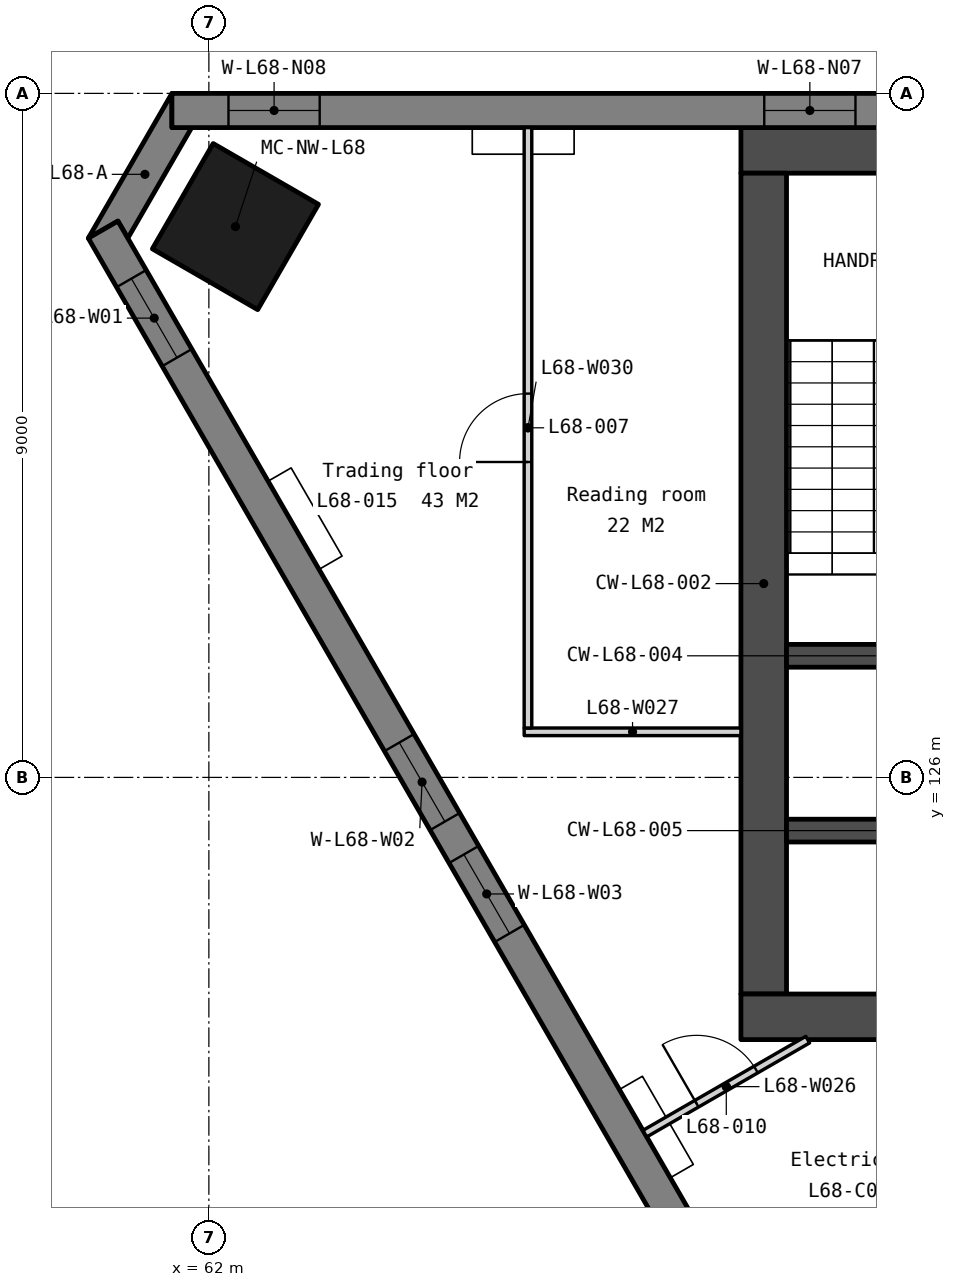
"""IFC4 building model, lengths in metres.
Left out: names, types, materials, properties, quantities, classifications, styles, units other than length and angle.
Written with IfcOpenShell. Run it as: python <this file> out.ifc"""

import sys

from ifc_helpers import new_model, si_unit, direction, frame, frame_2d, origin, origin_2d, place, context, subcontext, project, spatial, polyline, rectangle, outline, extrude, element, fill, save


model = new_model("IFC4")
c1 = context("Model", 3, precision=1e-05, world=origin(), true_north=direction((0.0, 1.0)))
c2 = subcontext(c1, "Body", "Model", "MODEL_VIEW")
j1 = project(units=[si_unit("LENGTHUNIT", "METRE"), si_unit("PLANEANGLEUNIT", "RADIAN")], contexts=[c1])
p1 = place(None, origin())
s1 = spatial("IfcSite", under=j1, at=p1, CompositionType="ELEMENT")
p2 = place(p1, origin())
s2 = spatial("IfcBuilding", under=s1, at=p2, CompositionType="ELEMENT")
p3 = place(p2, frame((0.0, 0.0, 277.7)))
s3 = spatial("IfcBuildingStorey", under=s2, at=p3, CompositionType="ELEMENT", Elevation=277.7)
p4 = place(p3, frame((62.349, 133.247, 0.0), z_axis=(0.0, 0.0, 1.0), x_axis=(-0.5, -0.866025403784, 0.0)))
e1 = element("IfcColumn", 1, at=p4, inside=s3, PredefinedType="COLUMN", context=c2, shape_type="SweptSolid", body=[
    extrude(rectangle(XDim=1.6, YDim=1.6, at=origin_2d()), origin(), (0.0, 0.0, 1.0), 3.9),
])
p5 = place(p3, frame((69.0, 134.25, 0.0), z_axis=(0.0, 0.0, 1.0), x_axis=(1.0, 0.0, 0.0)))
e2 = element("IfcWall", 2, at=p5, inside=s3, PredefinedType="SOLIDWALL", context=c2, shape_type="SweptSolid", body=[
    extrude(rectangle(XDim=22.0, YDim=0.6, at=frame_2d((11.0, 0.0))), origin(), (0.0, 0.0, 1.0), 3.75),
])
p6 = place(p3, frame((69.3, 133.95, 0.0), z_axis=(0.0, 0.0, 1.0), x_axis=(0.0, -1.0, 0.0)))
e3 = element("IfcWall", 3, at=p6, inside=s3, PredefinedType="SOLIDWALL", context=c2, shape_type="SweptSolid", body=[
    extrude(rectangle(XDim=10.8, YDim=0.6, at=frame_2d((5.4, 0.0))), origin(), (0.0, 0.0, 1.0), 3.75),
])
p7 = place(p3, frame((69.0, 122.85, 0.0), z_axis=(0.0, 0.0, 1.0), x_axis=(1.0, 0.0, 0.0)))
e4 = element("IfcWall", 4, at=p7, inside=s3, PredefinedType="SOLIDWALL", context=c2, shape_type="SweptSolid", body=[
    extrude(rectangle(XDim=22.0, YDim=0.6, at=frame_2d((11.0, 0.0))), origin(), (0.0, 0.0, 1.0), 3.75),
])
p8 = place(p7, frame((16.375, 0.0, 0.0)))
e5 = element("IfcOpeningElement", 5, at=p8, cuts=e4, PredefinedType="OPENING", context=c2, shape_type="SweptSolid", body=[
    extrude(rectangle(XDim=1.8, YDim=2.1, at=frame_2d((0.9, 1.05))), frame((0.0, 0.31, 0.0), z_axis=(0.0, -1.0, 0.0), x_axis=(1.0, 0.0, 0.0)), (0.0, 0.0, 1.0), 0.62),
])
p9 = place(p7, frame((3.825, 0.0, 0.0)))
e6 = element("IfcOpeningElement", 6, at=p9, cuts=e4, PredefinedType="OPENING", context=c2, shape_type="SweptSolid", body=[
    extrude(rectangle(XDim=1.8, YDim=2.1, at=frame_2d((0.9, 1.05))), frame((0.0, 0.31, 0.0), z_axis=(0.0, -1.0, 0.0), x_axis=(1.0, 0.0, 0.0)), (0.0, 0.0, 1.0), 0.62),
])
p10 = place(p7, frame((12.85, 0.0, 0.0)))
e7 = element("IfcOpeningElement", 7, at=p10, cuts=e4, PredefinedType="OPENING", context=c2, shape_type="SweptSolid", body=[
    extrude(rectangle(XDim=1.5, YDim=2.1, at=frame_2d((0.75, 1.05))), frame((0.0, 0.31, 0.0), z_axis=(0.0, -1.0, 0.0), x_axis=(1.0, 0.0, 0.0)), (0.0, 0.0, 1.0), 0.62),
])
for number, where, z_axis, x_axis in (
    (8, (69.6, 127.6, 0.0), (0.0, 0.0, 1.0), (1.0, 0.0, 0.0)),
    (9, (69.6, 125.3, 0.0), (0.0, 0.0, 1.0), (1.0, 0.0, 0.0)),
):
    element("IfcWall", number, at=place(p3, frame(where, z_axis=z_axis, x_axis=x_axis)), inside=s3, PredefinedType="SOLIDWALL", context=c2, shape_type="SweptSolid", body=[
        extrude(rectangle(XDim=2.55, YDim=0.3, at=frame_2d((1.275, 0.0))), origin(), (0.0, 0.0, 1.0), 3.75),
    ])
p11 = place(p3, frame((0.0, 0.0, -0.15)))
e10 = element("IfcWall", 10, at=p11, inside=s3, PredefinedType="SOLIDWALL", context=c2, shape_type="SweptSolid", body=[
    extrude(outline(polyline([(61.514, 135.0), (61.514, 134.55), (61.774, 134.55), (60.933, 133.095), (60.803, 133.32), (60.414, 133.095), (61.514, 135.0)])), origin(), (0.0, 0.0, 1.0), 3.9),
])
p12 = place(p3, frame((98.486, 134.775, -0.15), z_axis=(0.0, 0.0, 1.0), x_axis=(-1.0, 0.0, 0.0)))
e11 = element("IfcWall", 11, at=p12, inside=s3, PredefinedType="SOLIDWALL", context=c2, shape_type="SweptSolid", body=[
    extrude(outline(polyline([(36.972, 0.0), (36.972, 3.9), (0.0, 3.9), (0.0, 0.0), (36.972, 0.0)])), frame((0.0, 0.225, 0.0), z_axis=(0.0, -1.0, 0.0), x_axis=(1.0, 0.0, 0.0)), (0.0, 0.0, 1.0), 0.45),
])
p13 = place(p12, frame((0.744, 0.0, 0.95)))
e12 = element("IfcOpeningElement", 12, at=p13, cuts=e11, PredefinedType="OPENING", context=c2, shape_type="SweptSolid", body=[
    extrude(rectangle(XDim=1.2, YDim=2.2, at=frame_2d((0.6, 1.1))), frame((0.0, 0.235, 0.0), z_axis=(0.0, -1.0, 0.0), x_axis=(1.0, 0.0, 0.0)), (0.0, 0.0, 1.0), 0.47),
])
p14 = place(p12, frame((7.793, 0.0, 0.95)))
e13 = element("IfcOpeningElement", 13, at=p14, cuts=e11, PredefinedType="OPENING", context=c2, shape_type="SweptSolid", body=[
    extrude(rectangle(XDim=1.2, YDim=2.2, at=frame_2d((0.6, 1.1))), frame((0.0, 0.235, 0.0), z_axis=(0.0, -1.0, 0.0), x_axis=(1.0, 0.0, 0.0)), (0.0, 0.0, 1.0), 0.47),
])
p15 = place(p12, frame((9.493, 0.0, 0.95)))
e14 = element("IfcOpeningElement", 14, at=p15, cuts=e11, PredefinedType="OPENING", context=c2, shape_type="SweptSolid", body=[
    extrude(rectangle(XDim=1.2, YDim=2.2, at=frame_2d((0.6, 1.1))), frame((0.0, 0.235, 0.0), z_axis=(0.0, -1.0, 0.0), x_axis=(1.0, 0.0, 0.0)), (0.0, 0.0, 1.0), 0.47),
])
p16 = place(p12, frame((17.036, 0.0, 0.95)))
e15 = element("IfcOpeningElement", 15, at=p16, cuts=e11, PredefinedType="OPENING", context=c2, shape_type="SweptSolid", body=[
    extrude(rectangle(XDim=1.2, YDim=2.2, at=frame_2d((0.6, 1.1))), frame((0.0, 0.235, 0.0), z_axis=(0.0, -1.0, 0.0), x_axis=(1.0, 0.0, 0.0)), (0.0, 0.0, 1.0), 0.47),
])
p17 = place(p12, frame((18.736, 0.0, 0.95)))
e16 = element("IfcOpeningElement", 16, at=p17, cuts=e11, PredefinedType="OPENING", context=c2, shape_type="SweptSolid", body=[
    extrude(rectangle(XDim=1.2, YDim=2.2, at=frame_2d((0.6, 1.1))), frame((0.0, 0.235, 0.0), z_axis=(0.0, -1.0, 0.0), x_axis=(1.0, 0.0, 0.0)), (0.0, 0.0, 1.0), 0.47),
])
p18 = place(p12, frame((26.279, 0.0, 0.95)))
e17 = element("IfcOpeningElement", 17, at=p18, cuts=e11, PredefinedType="OPENING", context=c2, shape_type="SweptSolid", body=[
    extrude(rectangle(XDim=1.2, YDim=2.2, at=frame_2d((0.6, 1.1))), frame((0.0, 0.235, 0.0), z_axis=(0.0, -1.0, 0.0), x_axis=(1.0, 0.0, 0.0)), (0.0, 0.0, 1.0), 0.47),
])
p19 = place(p12, frame((27.979, 0.0, 0.95)))
e18 = element("IfcOpeningElement", 18, at=p19, cuts=e11, PredefinedType="OPENING", context=c2, shape_type="SweptSolid", body=[
    extrude(rectangle(XDim=1.2, YDim=2.2, at=frame_2d((0.6, 1.1))), frame((0.0, 0.235, 0.0), z_axis=(0.0, -1.0, 0.0), x_axis=(1.0, 0.0, 0.0)), (0.0, 0.0, 1.0), 0.47),
])
p20 = place(p12, frame((35.028, 0.0, 0.95)))
e19 = element("IfcOpeningElement", 19, at=p20, cuts=e11, PredefinedType="OPENING", context=c2, shape_type="SweptSolid", body=[
    extrude(rectangle(XDim=1.2, YDim=2.2, at=frame_2d((0.6, 1.1))), frame((0.0, 0.235, 0.0), z_axis=(0.0, -1.0, 0.0), x_axis=(1.0, 0.0, 0.0)), (0.0, 0.0, 1.0), 0.47),
])
p21 = place(p3, frame((60.609, 133.207, -0.15), z_axis=(0.0, 0.0, 1.0), x_axis=(0.500002536638, -0.866023939251, 0.0)))
e20 = element("IfcWall", 20, at=p21, inside=s3, PredefinedType="SOLIDWALL", context=c2, shape_type="SweptSolid", body=[
    extrude(outline(polyline([(36.972, 0.0), (36.972, 3.9), (0.0, 3.9), (0.0, 0.0), (36.972, 0.0)])), frame((0.0, 0.225, 0.0), z_axis=(0.0, -1.0, 0.0), x_axis=(1.0, 0.0, 0.0)), (0.0, 0.0, 1.0), 0.45),
])
p22 = place(p21, frame((0.744, 0.0, 0.95)))
e21 = element("IfcOpeningElement", 21, at=p22, cuts=e20, PredefinedType="OPENING", context=c2, shape_type="SweptSolid", body=[
    extrude(rectangle(XDim=1.2, YDim=2.2, at=frame_2d((0.6, 1.1))), frame((0.0, 0.235, 0.0), z_axis=(0.0, -1.0, 0.0), x_axis=(1.0, 0.0, 0.0)), (0.0, 0.0, 1.0), 0.47),
])
p23 = place(p21, frame((7.793, 0.0, 0.95)))
e22 = element("IfcOpeningElement", 22, at=p23, cuts=e20, PredefinedType="OPENING", context=c2, shape_type="SweptSolid", body=[
    extrude(rectangle(XDim=1.2, YDim=2.2, at=frame_2d((0.6, 1.1))), frame((0.0, 0.235, 0.0), z_axis=(0.0, -1.0, 0.0), x_axis=(1.0, 0.0, 0.0)), (0.0, 0.0, 1.0), 0.47),
])
p24 = place(p21, frame((9.493, 0.0, 0.95)))
e23 = element("IfcOpeningElement", 23, at=p24, cuts=e20, PredefinedType="OPENING", context=c2, shape_type="SweptSolid", body=[
    extrude(rectangle(XDim=1.2, YDim=2.2, at=frame_2d((0.6, 1.1))), frame((0.0, 0.235, 0.0), z_axis=(0.0, -1.0, 0.0), x_axis=(1.0, 0.0, 0.0)), (0.0, 0.0, 1.0), 0.47),
])
p25 = place(p21, frame((17.036, 0.0, 0.95)))
e24 = element("IfcOpeningElement", 24, at=p25, cuts=e20, PredefinedType="OPENING", context=c2, shape_type="SweptSolid", body=[
    extrude(rectangle(XDim=1.2, YDim=2.2, at=frame_2d((0.6, 1.1))), frame((0.0, 0.235, 0.0), z_axis=(0.0, -1.0, 0.0), x_axis=(1.0, 0.0, 0.0)), (0.0, 0.0, 1.0), 0.47),
])
p26 = place(p21, frame((18.736, 0.0, 0.95)))
e25 = element("IfcOpeningElement", 25, at=p26, cuts=e20, PredefinedType="OPENING", context=c2, shape_type="SweptSolid", body=[
    extrude(rectangle(XDim=1.2, YDim=2.2, at=frame_2d((0.6, 1.1))), frame((0.0, 0.235, 0.0), z_axis=(0.0, -1.0, 0.0), x_axis=(1.0, 0.0, 0.0)), (0.0, 0.0, 1.0), 0.47),
])
p27 = place(p21, frame((26.279, 0.0, 0.95)))
e26 = element("IfcOpeningElement", 26, at=p27, cuts=e20, PredefinedType="OPENING", context=c2, shape_type="SweptSolid", body=[
    extrude(rectangle(XDim=1.2, YDim=2.2, at=frame_2d((0.6, 1.1))), frame((0.0, 0.235, 0.0), z_axis=(0.0, -1.0, 0.0), x_axis=(1.0, 0.0, 0.0)), (0.0, 0.0, 1.0), 0.47),
])
p28 = place(p21, frame((27.979, 0.0, 0.95)))
e27 = element("IfcOpeningElement", 27, at=p28, cuts=e20, PredefinedType="OPENING", context=c2, shape_type="SweptSolid", body=[
    extrude(rectangle(XDim=1.2, YDim=2.2, at=frame_2d((0.6, 1.1))), frame((0.0, 0.235, 0.0), z_axis=(0.0, -1.0, 0.0), x_axis=(1.0, 0.0, 0.0)), (0.0, 0.0, 1.0), 0.47),
])
p29 = place(p21, frame((35.028, 0.0, 0.95)))
e28 = element("IfcOpeningElement", 28, at=p29, cuts=e20, PredefinedType="OPENING", context=c2, shape_type="SweptSolid", body=[
    extrude(rectangle(XDim=1.2, YDim=2.2, at=frame_2d((0.6, 1.1))), frame((0.0, 0.235, 0.0), z_axis=(0.0, -1.0, 0.0), x_axis=(1.0, 0.0, 0.0)), (0.0, 0.0, 1.0), 0.47),
])
p30 = place(p3, frame((67.736, 121.313, 0.0), z_axis=(0.0, 0.0, 1.0), x_axis=(0.86604923931, 0.499958713387, 0.0)))
e29 = element("IfcWall", 29, at=p30, inside=s3, PredefinedType="PARTITIONING", context=c2, shape_type="SweptSolid", body=[
    extrude(rectangle(XDim=2.475, YDim=0.1, at=frame_2d((1.237, 0.0))), origin(), (0.0, 0.0, 1.0), 3.75),
])
p31 = place(p30, frame((0.787, 0.0, 0.0)))
e30 = element("IfcOpeningElement", 30, at=p31, cuts=e29, PredefinedType="OPENING", context=c2, shape_type="SweptSolid", body=[
    extrude(rectangle(XDim=0.9, YDim=2.1, at=frame_2d((0.45, 1.05))), frame((0.0, 0.06, 0.0), z_axis=(0.0, -1.0, 0.0), x_axis=(1.0, 0.0, 0.0)), (0.0, 0.0, 1.0), 0.12),
])
p32 = place(p3, frame((66.148, 126.6, 0.0), z_axis=(0.0, 0.0, 1.0), x_axis=(1.0, 0.0, 0.0)))
e31 = element("IfcWall", 31, at=p32, inside=s3, PredefinedType="PARTITIONING", context=c2, shape_type="SweptSolid", body=[
    extrude(rectangle(XDim=2.852, YDim=0.1, at=frame_2d((1.426, 0.0))), origin(), (0.0, 0.0, 1.0), 3.75),
])
p33 = place(p3, frame((66.198, 126.65, 0.0), z_axis=(0.0, 0.0, 1.0), x_axis=(0.0, 1.0, 0.0)))
e32 = element("IfcWall", 32, at=p33, inside=s3, PredefinedType="PARTITIONING", context=c2, shape_type="SweptSolid", body=[
    extrude(rectangle(XDim=7.9, YDim=0.1, at=frame_2d((3.95, 0.0))), origin(), (0.0, 0.0, 1.0), 3.75),
])
p34 = place(p33, frame((3.5, 0.0, 0.0)))
e33 = element("IfcOpeningElement", 33, at=p34, cuts=e32, PredefinedType="OPENING", context=c2, shape_type="SweptSolid", body=[
    extrude(rectangle(XDim=0.9, YDim=2.1, at=frame_2d((0.45, 1.05))), frame((0.0, 0.06, 0.0), z_axis=(0.0, -1.0, 0.0), x_axis=(1.0, 0.0, 0.0)), (0.0, 0.0, 1.0), 0.12),
])
p35 = place(p19, origin())
e34 = element("IfcWindow", 34, at=p35, inside=s3, PartitioningType="SINGLE_PANEL", PredefinedType="WINDOW", context=c2, shape_type="SweptSolid", body=[
    extrude(rectangle(XDim=1.2, YDim=2.2, at=frame_2d((0.6, 1.1))), frame((0.0, 0.03, 0.0), z_axis=(0.0, -1.0, 0.0), x_axis=(1.0, 0.0, 0.0)), (0.0, 0.0, 1.0), 0.06),
])
fill(e18, e34)
p36 = place(p20, origin())
e35 = element("IfcWindow", 35, at=p36, inside=s3, PartitioningType="SINGLE_PANEL", PredefinedType="WINDOW", context=c2, shape_type="SweptSolid", body=[
    extrude(rectangle(XDim=1.2, YDim=2.2, at=frame_2d((0.6, 1.1))), frame((0.0, 0.03, 0.0), z_axis=(0.0, -1.0, 0.0), x_axis=(1.0, 0.0, 0.0)), (0.0, 0.0, 1.0), 0.06),
])
fill(e19, e35)
p37 = place(p22, origin())
e36 = element("IfcWindow", 36, at=p37, inside=s3, PartitioningType="SINGLE_PANEL", PredefinedType="WINDOW", context=c2, shape_type="SweptSolid", body=[
    extrude(rectangle(XDim=1.2, YDim=2.2, at=frame_2d((0.6, 1.1))), frame((0.0, 0.03, 0.0), z_axis=(0.0, -1.0, 0.0), x_axis=(1.0, 0.0, 0.0)), (0.0, 0.0, 1.0), 0.06),
])
fill(e21, e36)
p38 = place(p23, origin())
e37 = element("IfcWindow", 37, at=p38, inside=s3, PartitioningType="SINGLE_PANEL", PredefinedType="WINDOW", context=c2, shape_type="SweptSolid", body=[
    extrude(rectangle(XDim=1.2, YDim=2.2, at=frame_2d((0.6, 1.1))), frame((0.0, 0.03, 0.0), z_axis=(0.0, -1.0, 0.0), x_axis=(1.0, 0.0, 0.0)), (0.0, 0.0, 1.0), 0.06),
])
fill(e22, e37)
p39 = place(p24, origin())
e38 = element("IfcWindow", 38, at=p39, inside=s3, PartitioningType="SINGLE_PANEL", PredefinedType="WINDOW", context=c2, shape_type="SweptSolid", body=[
    extrude(rectangle(XDim=1.2, YDim=2.2, at=frame_2d((0.6, 1.1))), frame((0.0, 0.03, 0.0), z_axis=(0.0, -1.0, 0.0), x_axis=(1.0, 0.0, 0.0)), (0.0, 0.0, 1.0), 0.06),
])
fill(e23, e38)
p40 = place(p34, origin())
e39 = element("IfcDoor", 39, at=p40, inside=s3, OperationType="SINGLE_SWING_LEFT", PredefinedType="DOOR", context=c2, shape_type="SweptSolid", body=[
    extrude(rectangle(XDim=0.9, YDim=2.1, at=frame_2d((0.45, 1.05))), frame((0.0, 0.025, 0.0), z_axis=(0.0, -1.0, 0.0), x_axis=(1.0, 0.0, 0.0)), (0.0, 0.0, 1.0), 0.05),
])
fill(e33, e39)
p41 = place(p31, origin())
e40 = element("IfcDoor", 40, at=p41, inside=s3, OperationType="SINGLE_SWING_LEFT", PredefinedType="DOOR", context=c2, shape_type="SweptSolid", body=[
    extrude(rectangle(XDim=0.9, YDim=2.1, at=frame_2d((0.45, 1.05))), frame((0.0, 0.025, 0.0), z_axis=(0.0, -1.0, 0.0), x_axis=(1.0, 0.0, 0.0)), (0.0, 0.0, 1.0), 0.05),
])
fill(e30, e40)
save(model, sys.argv[1])
